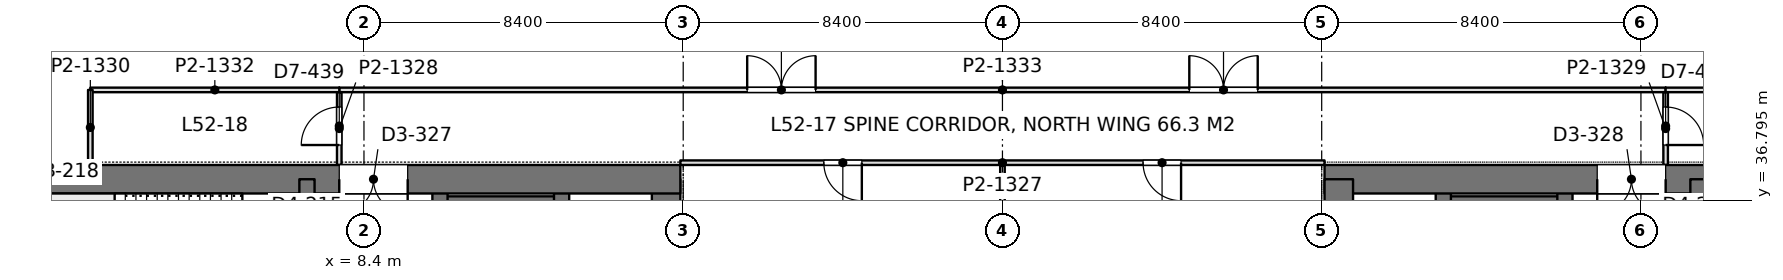
"""IFC4 building model, lengths in metres.
Left out: names, types, materials, properties, quantities, classifications, styles, units other than length and angle.
Written with IfcOpenShell. Run it as: python <this file> out.ifc"""

import sys

from ifc_helpers import new_model, si_unit, direction, frame, frame_2d, origin, place, context, subcontext, project, spatial, rectangle, extrude, element, fill, save


model = new_model("IFC4")
c1 = context("Model", 3, precision=1e-05, world=origin(), true_north=direction((0.0, 1.0)))
c2 = subcontext(c1, "Body", "Model", "MODEL_VIEW")
j1 = project(units=[si_unit("LENGTHUNIT", "METRE"), si_unit("PLANEANGLEUNIT", "RADIAN")], contexts=[c1])
p1 = place(None, origin())
s1 = spatial("IfcSite", under=j1, at=p1, CompositionType="ELEMENT")
p2 = place(p1, origin())
s2 = spatial("IfcBuilding", under=s1, at=p2, CompositionType="ELEMENT")
p3 = place(p2, frame((0.0, 0.0, 228.0)))
s3 = spatial("IfcBuildingStorey", under=s2, at=p3, CompositionType="ELEMENT", Elevation=228.0)
p4 = place(p3, frame((-1.125, 37.35, 0.0), z_axis=(0.0, 0.0, 1.0), x_axis=(1.0, 0.0, 0.0)))
e1 = element("IfcWall", 1, at=p4, inside=s3, PredefinedType="SHEAR", context=c2, shape_type="SweptSolid", body=[
    extrude(rectangle(XDim=17.85, YDim=0.75, at=frame_2d((8.925, 0.0))), origin(), (0.0, 0.0, 1.0), 4.2),
])
p5 = place(p4, frame((8.875, 0.0, 0.0)))
e2 = element("IfcOpeningElement", 2, at=p5, cuts=e1, PredefinedType="OPENING", context=c2, shape_type="SweptSolid", body=[
    extrude(rectangle(XDim=1.8, YDim=2.4, at=frame_2d((0.9, 1.2))), frame((0.0, 0.385, 0.0), z_axis=(0.0, -1.0, 0.0), x_axis=(1.0, 0.0, 0.0)), (0.0, 0.0, 1.0), 0.77),
])
p6 = place(p3, frame((16.35, 27.8, 0.0), z_axis=(0.0, 0.0, 1.0), x_axis=(0.0, 1.0, 0.0)))
e3 = element("IfcWall", 3, at=p6, inside=s3, PredefinedType="SHEAR", context=c2, shape_type="SweptSolid", body=[
    extrude(rectangle(XDim=9.55, YDim=0.75, at=frame_2d((4.775, 0.0))), origin(), (0.0, 0.0, 1.0), 4.2),
])
p7 = place(p3, frame((6.9, 13.05, 0.0), z_axis=(0.0, 0.0, 1.0), x_axis=(0.0, 1.0, 0.0)))
e4 = element("IfcWall", 4, at=p7, inside=s3, PredefinedType="SHEAR", context=c2, shape_type="SweptSolid", body=[
    extrude(rectangle(XDim=24.3, YDim=0.4, at=frame_2d((12.15, 0.0))), origin(), (0.0, 0.0, 1.0), 4.2),
])
p8 = place(p7, frame((1.3, 0.0, 0.0)))
e5 = element("IfcOpeningElement", 5, at=p8, cuts=e4, PredefinedType="OPENING", context=c2, shape_type="SweptSolid", body=[
    extrude(rectangle(XDim=1.0, YDim=2.2, at=frame_2d((0.5, 1.1))), frame((0.0, 0.21, 0.0), z_axis=(0.0, -1.0, 0.0), x_axis=(1.0, 0.0, 0.0)), (0.0, 0.0, 1.0), 0.42),
])
p9 = place(p7, frame((22.0, 0.0, 0.0)))
e6 = element("IfcOpeningElement", 6, at=p9, cuts=e4, PredefinedType="OPENING", context=c2, shape_type="SweptSolid", body=[
    extrude(rectangle(XDim=1.0, YDim=2.2, at=frame_2d((0.5, 1.1))), frame((0.0, 0.21, 0.0), z_axis=(0.0, -1.0, 0.0), x_axis=(1.0, 0.0, 0.0)), (0.0, 0.0, 1.0), 0.42),
])
p10 = place(p7, frame((5.55, 0.0, 0.0)))
e7 = element("IfcOpeningElement", 7, at=p10, cuts=e4, PredefinedType="OPENING", context=c2, shape_type="SweptSolid", body=[
    extrude(rectangle(XDim=1.0, YDim=2.2, at=frame_2d((0.5, 1.1))), frame((0.0, 0.21, 0.0), z_axis=(0.0, -1.0, 0.0), x_axis=(1.0, 0.0, 0.0)), (0.0, 0.0, 1.0), 0.42),
])
p11 = place(p7, frame((9.55, 0.0, 0.0)))
e8 = element("IfcOpeningElement", 8, at=p11, cuts=e4, PredefinedType="OPENING", context=c2, shape_type="SweptSolid", body=[
    extrude(rectangle(XDim=1.0, YDim=2.2, at=frame_2d((0.5, 1.1))), frame((0.0, 0.21, 0.0), z_axis=(0.0, -1.0, 0.0), x_axis=(1.0, 0.0, 0.0)), (0.0, 0.0, 1.0), 0.42),
])
p12 = place(p7, frame((12.8, 0.0, 0.0)))
e9 = element("IfcOpeningElement", 9, at=p12, cuts=e4, PredefinedType="OPENING", context=c2, shape_type="SweptSolid", body=[
    extrude(rectangle(XDim=1.1, YDim=2.2, at=frame_2d((0.55, 1.1))), frame((0.0, 0.21, 0.0), z_axis=(0.0, -1.0, 0.0), x_axis=(1.0, 0.0, 0.0)), (0.0, 0.0, 1.0), 0.42),
])
p13 = place(p7, frame((15.538, 0.0, 0.0)))
e10 = element("IfcOpeningElement", 10, at=p13, cuts=e4, PredefinedType="OPENING", context=c2, shape_type="SweptSolid", body=[
    extrude(rectangle(XDim=1.1, YDim=2.2, at=frame_2d((0.55, 1.1))), frame((0.0, 0.21, 0.0), z_axis=(0.0, -1.0, 0.0), x_axis=(1.0, 0.0, 0.0)), (0.0, 0.0, 1.0), 0.42),
])
p14 = place(p7, frame((18.262, 0.0, 0.0)))
e11 = element("IfcOpeningElement", 11, at=p14, cuts=e4, PredefinedType="OPENING", context=c2, shape_type="SweptSolid", body=[
    extrude(rectangle(XDim=1.1, YDim=2.2, at=frame_2d((0.55, 1.1))), frame((0.0, 0.21, 0.0), z_axis=(0.0, -1.0, 0.0), x_axis=(1.0, 0.0, 0.0)), (0.0, 0.0, 1.0), 0.42),
])
p15 = place(p3, frame((10.4, 13.05, 0.0), z_axis=(0.0, 0.0, 1.0), x_axis=(0.0, 1.0, 0.0)))
e12 = element("IfcWall", 12, at=p15, inside=s3, PredefinedType="SHEAR", context=c2, shape_type="SweptSolid", body=[
    extrude(rectangle(XDim=24.3, YDim=0.4, at=frame_2d((12.15, 0.0))), origin(), (0.0, 0.0, 1.0), 4.2),
])
p16 = place(p15, frame((15.75, 0.0, 0.0)))
e13 = element("IfcOpeningElement", 13, at=p16, cuts=e12, PredefinedType="OPENING", context=c2, shape_type="SweptSolid", body=[
    extrude(rectangle(XDim=1.1, YDim=2.2, at=frame_2d((0.55, 1.1))), frame((0.0, 0.21, 0.0), z_axis=(0.0, -1.0, 0.0), x_axis=(1.0, 0.0, 0.0)), (0.0, 0.0, 1.0), 0.42),
])
p17 = place(p15, frame((18.6, 0.0, 0.0)))
e14 = element("IfcOpeningElement", 14, at=p17, cuts=e12, PredefinedType="OPENING", context=c2, shape_type="SweptSolid", body=[
    extrude(rectangle(XDim=1.1, YDim=2.2, at=frame_2d((0.55, 1.1))), frame((0.0, 0.21, 0.0), z_axis=(0.0, -1.0, 0.0), x_axis=(1.0, 0.0, 0.0)), (0.0, 0.0, 1.0), 0.42),
])
p18 = place(p15, frame((21.45, 0.0, 0.0)))
e15 = element("IfcOpeningElement", 15, at=p18, cuts=e12, PredefinedType="OPENING", context=c2, shape_type="SweptSolid", body=[
    extrude(rectangle(XDim=1.1, YDim=2.2, at=frame_2d((0.55, 1.1))), frame((0.0, 0.21, 0.0), z_axis=(0.0, -1.0, 0.0), x_axis=(1.0, 0.0, 0.0)), (0.0, 0.0, 1.0), 0.42),
])
p19 = place(p15, frame((8.65, 0.0, 0.0)))
e16 = element("IfcOpeningElement", 16, at=p19, cuts=e12, PredefinedType="OPENING", context=c2, shape_type="SweptSolid", body=[
    extrude(rectangle(XDim=1.8, YDim=2.4, at=frame_2d((0.9, 1.2))), frame((0.0, 0.21, 0.0), z_axis=(0.0, -1.0, 0.0), x_axis=(1.0, 0.0, 0.0)), (0.0, 0.0, 1.0), 0.42),
])
p20 = place(p3, frame((13.6, 27.925, 0.0), z_axis=(0.0, 0.0, 1.0), x_axis=(0.0, 1.0, 0.0)))
e17 = element("IfcWall", 17, at=p20, inside=s3, PredefinedType="SHEAR", context=c2, shape_type="SweptSolid", body=[
    extrude(rectangle(XDim=9.425, YDim=0.4, at=frame_2d((4.712, 0.0))), origin(), (0.0, 0.0, 1.0), 4.2),
])
p21 = place(p3, frame((10.4, 36.625, 0.0), z_axis=(0.0, 0.0, 1.0), x_axis=(1.0, 0.0, 0.0)))
e18 = element("IfcWall", 18, at=p21, inside=s3, PredefinedType="SHEAR", context=c2, shape_type="SweptSolid", body=[
    extrude(rectangle(XDim=3.2, YDim=0.55, at=frame_2d((1.6, 0.0))), origin(), (0.0, 0.0, 1.0), 4.2),
])
p22 = place(p3, frame((33.675, 37.35, 0.0), z_axis=(0.0, 0.0, 1.0), x_axis=(1.0, 0.0, 0.0)))
e19 = element("IfcWall", 19, at=p22, inside=s3, PredefinedType="SHEAR", context=c2, shape_type="SweptSolid", body=[
    extrude(rectangle(XDim=17.85, YDim=0.75, at=frame_2d((8.925, 0.0))), origin(), (0.0, 0.0, 1.0), 4.2),
])
p23 = place(p22, frame((7.175, 0.0, 0.0)))
e20 = element("IfcOpeningElement", 20, at=p23, cuts=e19, PredefinedType="OPENING", context=c2, shape_type="SweptSolid", body=[
    extrude(rectangle(XDim=1.8, YDim=2.4, at=frame_2d((0.9, 1.2))), frame((0.0, 0.385, 0.0), z_axis=(0.0, -1.0, 0.0), x_axis=(1.0, 0.0, 0.0)), (0.0, 0.0, 1.0), 0.77),
])
p24 = place(p3, frame((34.05, 27.8, 0.0), z_axis=(0.0, 0.0, 1.0), x_axis=(0.0, 1.0, 0.0)))
e21 = element("IfcWall", 21, at=p24, inside=s3, PredefinedType="SHEAR", context=c2, shape_type="SweptSolid", body=[
    extrude(rectangle(XDim=9.55, YDim=0.75, at=frame_2d((4.775, 0.0))), origin(), (0.0, 0.0, 1.0), 4.2),
])
p25 = place(p3, frame((43.5, 13.05, 0.0), z_axis=(0.0, 0.0, 1.0), x_axis=(0.0, 1.0, 0.0)))
e22 = element("IfcWall", 22, at=p25, inside=s3, PredefinedType="SHEAR", context=c2, shape_type="SweptSolid", body=[
    extrude(rectangle(XDim=24.3, YDim=0.4, at=frame_2d((12.15, 0.0))), origin(), (0.0, 0.0, 1.0), 4.2),
])
p26 = place(p25, frame((1.3, 0.0, 0.0)))
e23 = element("IfcOpeningElement", 23, at=p26, cuts=e22, PredefinedType="OPENING", context=c2, shape_type="SweptSolid", body=[
    extrude(rectangle(XDim=1.0, YDim=2.2, at=frame_2d((0.5, 1.1))), frame((0.0, 0.21, 0.0), z_axis=(0.0, -1.0, 0.0), x_axis=(1.0, 0.0, 0.0)), (0.0, 0.0, 1.0), 0.42),
])
p27 = place(p25, frame((22.0, 0.0, 0.0)))
e24 = element("IfcOpeningElement", 24, at=p27, cuts=e22, PredefinedType="OPENING", context=c2, shape_type="SweptSolid", body=[
    extrude(rectangle(XDim=1.0, YDim=2.2, at=frame_2d((0.5, 1.1))), frame((0.0, 0.21, 0.0), z_axis=(0.0, -1.0, 0.0), x_axis=(1.0, 0.0, 0.0)), (0.0, 0.0, 1.0), 0.42),
])
p28 = place(p25, frame((5.55, 0.0, 0.0)))
e25 = element("IfcOpeningElement", 25, at=p28, cuts=e22, PredefinedType="OPENING", context=c2, shape_type="SweptSolid", body=[
    extrude(rectangle(XDim=1.0, YDim=2.2, at=frame_2d((0.5, 1.1))), frame((0.0, 0.21, 0.0), z_axis=(0.0, -1.0, 0.0), x_axis=(1.0, 0.0, 0.0)), (0.0, 0.0, 1.0), 0.42),
])
p29 = place(p25, frame((9.55, 0.0, 0.0)))
e26 = element("IfcOpeningElement", 26, at=p29, cuts=e22, PredefinedType="OPENING", context=c2, shape_type="SweptSolid", body=[
    extrude(rectangle(XDim=1.0, YDim=2.2, at=frame_2d((0.5, 1.1))), frame((0.0, 0.21, 0.0), z_axis=(0.0, -1.0, 0.0), x_axis=(1.0, 0.0, 0.0)), (0.0, 0.0, 1.0), 0.42),
])
p30 = place(p25, frame((12.8, 0.0, 0.0)))
e27 = element("IfcOpeningElement", 27, at=p30, cuts=e22, PredefinedType="OPENING", context=c2, shape_type="SweptSolid", body=[
    extrude(rectangle(XDim=1.1, YDim=2.2, at=frame_2d((0.55, 1.1))), frame((0.0, 0.21, 0.0), z_axis=(0.0, -1.0, 0.0), x_axis=(1.0, 0.0, 0.0)), (0.0, 0.0, 1.0), 0.42),
])
p31 = place(p25, frame((15.538, 0.0, 0.0)))
e28 = element("IfcOpeningElement", 28, at=p31, cuts=e22, PredefinedType="OPENING", context=c2, shape_type="SweptSolid", body=[
    extrude(rectangle(XDim=1.1, YDim=2.2, at=frame_2d((0.55, 1.1))), frame((0.0, 0.21, 0.0), z_axis=(0.0, -1.0, 0.0), x_axis=(1.0, 0.0, 0.0)), (0.0, 0.0, 1.0), 0.42),
])
p32 = place(p25, frame((18.262, 0.0, 0.0)))
e29 = element("IfcOpeningElement", 29, at=p32, cuts=e22, PredefinedType="OPENING", context=c2, shape_type="SweptSolid", body=[
    extrude(rectangle(XDim=1.1, YDim=2.2, at=frame_2d((0.55, 1.1))), frame((0.0, 0.21, 0.0), z_axis=(0.0, -1.0, 0.0), x_axis=(1.0, 0.0, 0.0)), (0.0, 0.0, 1.0), 0.42),
])
p33 = place(p3, frame((40.0, 13.05, 0.0), z_axis=(0.0, 0.0, 1.0), x_axis=(0.0, 1.0, 0.0)))
e30 = element("IfcWall", 30, at=p33, inside=s3, PredefinedType="SHEAR", context=c2, shape_type="SweptSolid", body=[
    extrude(rectangle(XDim=24.3, YDim=0.4, at=frame_2d((12.15, 0.0))), origin(), (0.0, 0.0, 1.0), 4.2),
])
p34 = place(p33, frame((15.75, 0.0, 0.0)))
e31 = element("IfcOpeningElement", 31, at=p34, cuts=e30, PredefinedType="OPENING", context=c2, shape_type="SweptSolid", body=[
    extrude(rectangle(XDim=1.1, YDim=2.2, at=frame_2d((0.55, 1.1))), frame((0.0, 0.21, 0.0), z_axis=(0.0, -1.0, 0.0), x_axis=(1.0, 0.0, 0.0)), (0.0, 0.0, 1.0), 0.42),
])
p35 = place(p33, frame((18.6, 0.0, 0.0)))
e32 = element("IfcOpeningElement", 32, at=p35, cuts=e30, PredefinedType="OPENING", context=c2, shape_type="SweptSolid", body=[
    extrude(rectangle(XDim=1.1, YDim=2.2, at=frame_2d((0.55, 1.1))), frame((0.0, 0.21, 0.0), z_axis=(0.0, -1.0, 0.0), x_axis=(1.0, 0.0, 0.0)), (0.0, 0.0, 1.0), 0.42),
])
p36 = place(p33, frame((21.45, 0.0, 0.0)))
e33 = element("IfcOpeningElement", 33, at=p36, cuts=e30, PredefinedType="OPENING", context=c2, shape_type="SweptSolid", body=[
    extrude(rectangle(XDim=1.1, YDim=2.2, at=frame_2d((0.55, 1.1))), frame((0.0, 0.21, 0.0), z_axis=(0.0, -1.0, 0.0), x_axis=(1.0, 0.0, 0.0)), (0.0, 0.0, 1.0), 0.42),
])
p37 = place(p33, frame((8.65, 0.0, 0.0)))
e34 = element("IfcOpeningElement", 34, at=p37, cuts=e30, PredefinedType="OPENING", context=c2, shape_type="SweptSolid", body=[
    extrude(rectangle(XDim=1.8, YDim=2.4, at=frame_2d((0.9, 1.2))), frame((0.0, 0.21, 0.0), z_axis=(0.0, -1.0, 0.0), x_axis=(1.0, 0.0, 0.0)), (0.0, 0.0, 1.0), 0.42),
])
p38 = place(p3, frame((36.8, 27.925, 0.0), z_axis=(0.0, 0.0, 1.0), x_axis=(0.0, 1.0, 0.0)))
e35 = element("IfcWall", 35, at=p38, inside=s3, PredefinedType="SHEAR", context=c2, shape_type="SweptSolid", body=[
    extrude(rectangle(XDim=9.425, YDim=0.4, at=frame_2d((4.712, 0.0))), origin(), (0.0, 0.0, 1.0), 4.2),
])
p39 = place(p3, frame((40.0, 36.625, 0.0), z_axis=(0.0, 0.0, 1.0), x_axis=(-1.0, 0.0, 0.0)))
e36 = element("IfcWall", 36, at=p39, inside=s3, PredefinedType="SHEAR", context=c2, shape_type="SweptSolid", body=[
    extrude(rectangle(XDim=3.2, YDim=0.55, at=frame_2d((1.6, 0.0))), origin(), (0.0, 0.0, 1.0), 4.2),
])
p40 = place(p3, frame((7.748, 39.7, 0.0), z_axis=(0.0, 0.0, 1.0), x_axis=(1.0, 0.0, 0.0)))
e37 = element("IfcWall", 37, at=p40, inside=s3, PredefinedType="PARTITIONING", context=c2, shape_type="SweptSolid", body=[
    extrude(rectangle(XDim=34.904, YDim=0.12, at=frame_2d((17.452, 0.0))), origin(), (0.0, 0.0, 1.0), 3.55),
])
p41 = place(p40, frame((10.735, 0.0, 0.0)))
e38 = element("IfcOpeningElement", 38, at=p41, cuts=e37, PredefinedType="OPENING", context=c2, shape_type="SweptSolid", body=[
    extrude(rectangle(XDim=1.8, YDim=2.2, at=frame_2d((0.9, 1.1))), frame((0.0, 0.07, 0.0), z_axis=(0.0, -1.0, 0.0), x_axis=(1.0, 0.0, 0.0)), (0.0, 0.0, 1.0), 0.14),
])
p42 = place(p40, frame((22.369, 0.0, 0.0)))
e39 = element("IfcOpeningElement", 39, at=p42, cuts=e37, PredefinedType="OPENING", context=c2, shape_type="SweptSolid", body=[
    extrude(rectangle(XDim=1.8, YDim=2.2, at=frame_2d((0.9, 1.1))), frame((0.0, 0.07, 0.0), z_axis=(0.0, -1.0, 0.0), x_axis=(1.0, 0.0, 0.0)), (0.0, 0.0, 1.0), 0.14),
])
p43 = place(p3, frame((7.75, 37.724, 0.0), z_axis=(0.0, 0.0, 1.0), x_axis=(0.0, 1.0, 0.0)))
e40 = element("IfcWall", 40, at=p43, inside=s3, PredefinedType="PARTITIONING", context=c2, shape_type="SweptSolid", body=[
    extrude(rectangle(XDim=1.918, YDim=0.12, at=frame_2d((0.959, 0.0))), origin(), (0.0, 0.0, 1.0), 4.05),
])
p44 = place(p43, frame((0.526, 0.0, 0.0)))
e41 = element("IfcOpeningElement", 41, at=p44, cuts=e40, PredefinedType="OPENING", context=c2, shape_type="SweptSolid", body=[
    extrude(rectangle(XDim=1.0, YDim=2.4, at=frame_2d((0.5, 1.2))), frame((0.0, 0.07, 0.0), z_axis=(0.0, -1.0, 0.0), x_axis=(1.0, 0.0, 0.0)), (0.0, 0.0, 1.0), 0.14),
])
p45 = place(p3, frame((42.65, 37.724, 0.0), z_axis=(0.0, 0.0, 1.0), x_axis=(0.0, 1.0, 0.0)))
e42 = element("IfcWall", 42, at=p45, inside=s3, PredefinedType="PARTITIONING", context=c2, shape_type="SweptSolid", body=[
    extrude(rectangle(XDim=1.918, YDim=0.12, at=frame_2d((0.959, 0.0))), origin(), (0.0, 0.0, 1.0), 4.05),
])
p46 = place(p45, frame((0.526, 0.0, 0.0)))
e43 = element("IfcOpeningElement", 43, at=p46, cuts=e42, PredefinedType="OPENING", context=c2, shape_type="SweptSolid", body=[
    extrude(rectangle(XDim=1.0, YDim=2.4, at=frame_2d((0.5, 1.2))), frame((0.0, 0.07, 0.0), z_axis=(0.0, -1.0, 0.0), x_axis=(1.0, 0.0, 0.0)), (0.0, 0.0, 1.0), 0.14),
])
p47 = place(p3, frame((1.2, 39.7, 0.0), z_axis=(0.0, 0.0, 1.0), x_axis=(1.0, 0.0, 0.0)))
e44 = element("IfcWall", 44, at=p47, inside=s3, PredefinedType="PARTITIONING", context=c2, shape_type="SweptSolid", body=[
    extrude(rectangle(XDim=6.552, YDim=0.12, at=frame_2d((3.276, 0.0))), origin(), (0.0, 0.0, 1.0), 3.69),
])
p48 = place(p3, frame((1.2, 37.724, 0.0), z_axis=(0.0, 0.0, 1.0), x_axis=(0.0, 1.0, 0.0)))
e45 = element("IfcWall", 45, at=p48, inside=s3, PredefinedType="PARTITIONING", context=c2, shape_type="SweptSolid", body=[
    extrude(rectangle(XDim=1.976, YDim=0.12, at=frame_2d((0.988, 0.0))), origin(), (0.0, 0.0, 1.0), 4.05),
])
p49 = place(p3, frame((42.648, 39.7, 0.0), z_axis=(0.0, 0.0, 1.0), x_axis=(1.0, 0.0, 0.0)))
e46 = element("IfcWall", 46, at=p49, inside=s3, PredefinedType="PARTITIONING", context=c2, shape_type="SweptSolid", body=[
    extrude(rectangle(XDim=6.552, YDim=0.12, at=frame_2d((3.276, 0.0))), origin(), (0.0, 0.0, 1.0), 3.69),
])
p50 = place(p3, frame((25.2, 34.149, 0.0), z_axis=(0.0, 0.0, 1.0), x_axis=(0.0, 1.0, 0.0)))
e47 = element("IfcWall", 47, at=p50, inside=s3, PredefinedType="PARTITIONING", context=c2, shape_type="SweptSolid", body=[
    extrude(rectangle(XDim=3.593, YDim=0.12, at=frame_2d((1.796, 0.0))), origin(), (0.0, 0.0, 1.0), 3.55),
])
p51 = place(p3, frame((16.725, 37.785, 0.0), z_axis=(0.0, 0.0, 1.0), x_axis=(1.0, 0.0, 0.0)))
e48 = element("IfcWall", 48, at=p51, inside=s3, PredefinedType="PARTITIONING", context=c2, shape_type="SweptSolid", body=[
    extrude(rectangle(XDim=16.95, YDim=0.12, at=frame_2d((8.475, 0.0))), origin(), (0.0, 0.0, 1.0), 3.55),
])
p52 = place(p51, frame((3.775, 0.0, 0.0)))
e49 = element("IfcOpeningElement", 49, at=p52, cuts=e48, PredefinedType="OPENING", context=c2, shape_type="SweptSolid", body=[
    extrude(rectangle(XDim=1.0, YDim=2.4, at=frame_2d((0.5, 1.2))), frame((0.0, 0.07, 0.0), z_axis=(0.0, -1.0, 0.0), x_axis=(1.0, 0.0, 0.0)), (0.0, 0.0, 1.0), 0.14),
])
p53 = place(p51, frame((12.175, 0.0, 0.0)))
e50 = element("IfcOpeningElement", 50, at=p53, cuts=e48, PredefinedType="OPENING", context=c2, shape_type="SweptSolid", body=[
    extrude(rectangle(XDim=1.0, YDim=2.4, at=frame_2d((0.5, 1.2))), frame((0.0, 0.07, 0.0), z_axis=(0.0, -1.0, 0.0), x_axis=(1.0, 0.0, 0.0)), (0.0, 0.0, 1.0), 0.14),
])
p54 = place(p5, frame((1.8, 0.0, 0.0), z_axis=(0.0, 0.0, 1.0), x_axis=(-1.0, 0.0, 0.0)))
e51 = element("IfcDoor", 51, at=p54, inside=s3, OperationType="DOUBLE_DOOR_SINGLE_SWING", PredefinedType="DOOR", context=c2, shape_type="SweptSolid", body=[
    extrude(rectangle(XDim=1.8, YDim=2.4, at=frame_2d((0.9, 1.2))), frame((0.0, 0.025, 0.0), z_axis=(0.0, -1.0, 0.0), x_axis=(1.0, 0.0, 0.0)), (0.0, 0.0, 1.0), 0.05),
])
fill(e2, e51)
p55 = place(p23, frame((1.8, 0.0, 0.0), z_axis=(0.0, 0.0, 1.0), x_axis=(-1.0, 0.0, 0.0)))
e52 = element("IfcDoor", 52, at=p55, inside=s3, OperationType="DOUBLE_DOOR_SINGLE_SWING", PredefinedType="DOOR", context=c2, shape_type="SweptSolid", body=[
    extrude(rectangle(XDim=1.8, YDim=2.4, at=frame_2d((0.9, 1.2))), frame((0.0, 0.025, 0.0), z_axis=(0.0, -1.0, 0.0), x_axis=(1.0, 0.0, 0.0)), (0.0, 0.0, 1.0), 0.05),
])
fill(e20, e52)
p56 = place(p41, origin())
e53 = element("IfcDoor", 53, at=p56, inside=s3, OperationType="DOUBLE_DOOR_SINGLE_SWING", PredefinedType="DOOR", context=c2, shape_type="SweptSolid", body=[
    extrude(rectangle(XDim=1.8, YDim=2.2, at=frame_2d((0.9, 1.1))), frame((0.0, 0.025, 0.0), z_axis=(0.0, -1.0, 0.0), x_axis=(1.0, 0.0, 0.0)), (0.0, 0.0, 1.0), 0.05),
])
fill(e38, e53)
p57 = place(p42, origin())
e54 = element("IfcDoor", 54, at=p57, inside=s3, OperationType="DOUBLE_DOOR_SINGLE_SWING", PredefinedType="DOOR", context=c2, shape_type="SweptSolid", body=[
    extrude(rectangle(XDim=1.8, YDim=2.2, at=frame_2d((0.9, 1.1))), frame((0.0, 0.025, 0.0), z_axis=(0.0, -1.0, 0.0), x_axis=(1.0, 0.0, 0.0)), (0.0, 0.0, 1.0), 0.05),
])
fill(e39, e54)
p58 = place(p44, origin())
e55 = element("IfcDoor", 55, at=p58, inside=s3, OperationType="SINGLE_SWING_LEFT", PredefinedType="DOOR", context=c2, shape_type="SweptSolid", body=[
    extrude(rectangle(XDim=1.0, YDim=2.4, at=frame_2d((0.5, 1.2))), frame((0.0, 0.025, 0.0), z_axis=(0.0, -1.0, 0.0), x_axis=(1.0, 0.0, 0.0)), (0.0, 0.0, 1.0), 0.05),
])
fill(e41, e55)
p59 = place(p46, frame((1.0, 0.0, 0.0), z_axis=(0.0, 0.0, 1.0), x_axis=(-1.0, 0.0, 0.0)))
e56 = element("IfcDoor", 56, at=p59, inside=s3, OperationType="SINGLE_SWING_RIGHT", PredefinedType="DOOR", context=c2, shape_type="SweptSolid", body=[
    extrude(rectangle(XDim=1.0, YDim=2.4, at=frame_2d((0.5, 1.2))), frame((0.0, 0.025, 0.0), z_axis=(0.0, -1.0, 0.0), x_axis=(1.0, 0.0, 0.0)), (0.0, 0.0, 1.0), 0.05),
])
fill(e43, e56)
p60 = place(p52, frame((1.0, 0.0, 0.0), z_axis=(0.0, 0.0, 1.0), x_axis=(-1.0, 0.0, 0.0)))
e57 = element("IfcDoor", 57, at=p60, inside=s3, OperationType="SINGLE_SWING_LEFT", PredefinedType="DOOR", context=c2, shape_type="SweptSolid", body=[
    extrude(rectangle(XDim=1.0, YDim=2.4, at=frame_2d((0.5, 1.2))), frame((0.0, 0.025, 0.0), z_axis=(0.0, -1.0, 0.0), x_axis=(1.0, 0.0, 0.0)), (0.0, 0.0, 1.0), 0.05),
])
fill(e49, e57)
p61 = place(p53, frame((1.0, 0.0, 0.0), z_axis=(0.0, 0.0, 1.0), x_axis=(-1.0, 0.0, 0.0)))
e58 = element("IfcDoor", 58, at=p61, inside=s3, OperationType="SINGLE_SWING_LEFT", PredefinedType="DOOR", context=c2, shape_type="SweptSolid", body=[
    extrude(rectangle(XDim=1.0, YDim=2.4, at=frame_2d((0.5, 1.2))), frame((0.0, 0.025, 0.0), z_axis=(0.0, -1.0, 0.0), x_axis=(1.0, 0.0, 0.0)), (0.0, 0.0, 1.0), 0.05),
])
fill(e50, e58)
save(model, sys.argv[1])
